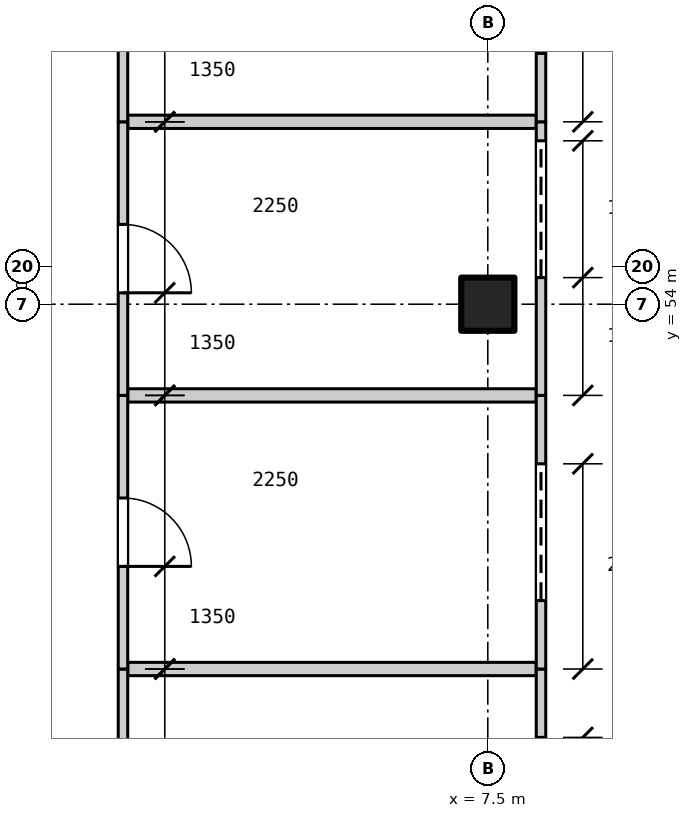
"""IFC4 building model, lengths in metres.
Left out: names, types, materials, properties, quantities, classifications, styles, units other than length and angle.
Written with IfcOpenShell. Run it as: python <this file> out.ifc"""

import sys

from ifc_helpers import new_model, si_unit, direction, frame, frame_2d, origin, origin_2d, place, context, subcontext, project, spatial, rectangle, extrude, element, fill, save


model = new_model("IFC4")
c1 = context("Model", 3, precision=1e-05, world=origin(), true_north=direction((0.0, 1.0)))
c2 = subcontext(c1, "Body", "Model", "MODEL_VIEW")
j1 = project(units=[si_unit("LENGTHUNIT", "METRE"), si_unit("PLANEANGLEUNIT", "RADIAN")], contexts=[c1])
p1 = place(None, origin())
s1 = spatial("IfcSite", under=j1, at=p1, CompositionType="ELEMENT")
p2 = place(p1, origin())
s2 = spatial("IfcBuilding", under=s1, at=p2, CompositionType="ELEMENT")
p3 = place(p2, origin())
s3 = spatial("IfcBuildingStorey", under=s2, at=p3, CompositionType="ELEMENT", Elevation=0.0)
p4 = place(p3, frame((7.5, 54.0, 0.0), z_axis=(0.0, 0.0, 1.0), x_axis=(1.0, 0.0, 0.0)))
e1 = element("IfcColumn", 1, at=p4, inside=s3, PredefinedType="COLUMN", context=c2, shape_type="SweptSolid", body=[
    extrude(rectangle(XDim=0.7, YDim=0.7, at=origin_2d()), origin(), (0.0, 0.0, 1.0), 6.0),
])
for number, where, z_axis, x_axis in (
    (2, (2.762, 49.2, 0.0), (0.0, 0.0, 1.0), (1.0, 0.0, 0.0)),
    (3, (2.762, 52.8, 0.0), (0.0, 0.0, 1.0), (1.0, 0.0, 0.0)),
    (4, (2.762, 56.4, 0.0), (0.0, 0.0, 1.0), (1.0, 0.0, 0.0)),
):
    element("IfcWall", number, at=place(p3, frame(where, z_axis=z_axis, x_axis=x_axis)), inside=s3, PredefinedType="PARTITIONING", context=c2, shape_type="SweptSolid", body=[
        extrude(rectangle(XDim=5.375, YDim=0.175, at=frame_2d((2.688, 0.0))), origin(), (0.0, 0.0, 1.0), 3.0),
    ])
p5 = place(p3, frame((2.7, 45.6, 0.0), z_axis=(0.0, 0.0, 1.0), x_axis=(0.0, 1.0, 0.0)))
e5 = element("IfcWall", 5, at=p5, inside=s3, PredefinedType="PARTITIONING", context=c2, shape_type="SweptSolid", body=[
    extrude(rectangle(XDim=3.6, YDim=0.125, at=frame_2d((1.8, 0.0))), origin(), (0.0, 0.0, 1.0), 3.0),
])
p6 = place(p5, frame((1.35, 0.0, 0.0)))
e6 = element("IfcOpeningElement", 6, at=p6, cuts=e5, PredefinedType="OPENING", context=c2, shape_type="SweptSolid", body=[
    extrude(rectangle(XDim=0.9, YDim=2.1, at=frame_2d((0.45, 1.05))), frame((0.0, 0.073, 0.0), z_axis=(0.0, -1.0, 0.0), x_axis=(1.0, 0.0, 0.0)), (0.0, 0.0, 1.0), 0.145),
])
p7 = place(p3, frame((2.7, 49.2, 0.0), z_axis=(0.0, 0.0, 1.0), x_axis=(0.0, 1.0, 0.0)))
e7 = element("IfcWall", 7, at=p7, inside=s3, PredefinedType="PARTITIONING", context=c2, shape_type="SweptSolid", body=[
    extrude(rectangle(XDim=3.6, YDim=0.125, at=frame_2d((1.8, 0.0))), origin(), (0.0, 0.0, 1.0), 3.0),
])
p8 = place(p7, frame((1.35, 0.0, 0.0)))
e8 = element("IfcOpeningElement", 8, at=p8, cuts=e7, PredefinedType="OPENING", context=c2, shape_type="SweptSolid", body=[
    extrude(rectangle(XDim=0.9, YDim=2.1, at=frame_2d((0.45, 1.05))), frame((0.0, 0.073, 0.0), z_axis=(0.0, -1.0, 0.0), x_axis=(1.0, 0.0, 0.0)), (0.0, 0.0, 1.0), 0.145),
])
p9 = place(p3, frame((2.7, 52.8, 0.0), z_axis=(0.0, 0.0, 1.0), x_axis=(0.0, 1.0, 0.0)))
e9 = element("IfcWall", 9, at=p9, inside=s3, PredefinedType="PARTITIONING", context=c2, shape_type="SweptSolid", body=[
    extrude(rectangle(XDim=3.6, YDim=0.125, at=frame_2d((1.8, 0.0))), origin(), (0.0, 0.0, 1.0), 3.0),
])
p10 = place(p9, frame((1.35, 0.0, 0.0)))
e10 = element("IfcOpeningElement", 10, at=p10, cuts=e9, PredefinedType="OPENING", context=c2, shape_type="SweptSolid", body=[
    extrude(rectangle(XDim=0.9, YDim=2.1, at=frame_2d((0.45, 1.05))), frame((0.0, 0.073, 0.0), z_axis=(0.0, -1.0, 0.0), x_axis=(1.0, 0.0, 0.0)), (0.0, 0.0, 1.0), 0.145),
])
p11 = place(p3, frame((2.7, 56.4, 0.0), z_axis=(0.0, 0.0, 1.0), x_axis=(0.0, 1.0, 0.0)))
e11 = element("IfcWall", 11, at=p11, inside=s3, PredefinedType="PARTITIONING", context=c2, shape_type="SweptSolid", body=[
    extrude(rectangle(XDim=3.6, YDim=0.125, at=frame_2d((1.8, 0.0))), origin(), (0.0, 0.0, 1.0), 3.0),
])
p12 = place(p11, frame((1.35, 0.0, 0.0)))
e12 = element("IfcOpeningElement", 12, at=p12, cuts=e11, PredefinedType="OPENING", context=c2, shape_type="SweptSolid", body=[
    extrude(rectangle(XDim=0.9, YDim=2.1, at=frame_2d((0.45, 1.05))), frame((0.0, 0.073, 0.0), z_axis=(0.0, -1.0, 0.0), x_axis=(1.0, 0.0, 0.0)), (0.0, 0.0, 1.0), 0.145),
])
p13 = place(p3, frame((8.2, 45.6, 0.0), z_axis=(0.0, 0.0, 1.0), x_axis=(0.0, 1.0, 0.0)))
e13 = element("IfcWall", 13, at=p13, inside=s3, PredefinedType="PARTITIONING", context=c2, shape_type="SweptSolid", body=[
    extrude(rectangle(XDim=3.6, YDim=0.125, at=frame_2d((1.8, 0.0))), origin(), (0.0, 0.0, 1.0), 3.0),
])
p14 = place(p13, frame((0.9, 0.0, 0.0)))
e14 = element("IfcOpeningElement", 14, at=p14, cuts=e13, PredefinedType="OPENING", context=c2, shape_type="SweptSolid", body=[
    extrude(rectangle(XDim=1.8, YDim=2.4, at=frame_2d((0.9, 1.2))), frame((0.0, 0.073, 0.0), z_axis=(0.0, -1.0, 0.0), x_axis=(1.0, 0.0, 0.0)), (0.0, 0.0, 1.0), 0.145),
])
p15 = place(p3, frame((8.2, 49.2, 0.0), z_axis=(0.0, 0.0, 1.0), x_axis=(0.0, 1.0, 0.0)))
e15 = element("IfcWall", 15, at=p15, inside=s3, PredefinedType="PARTITIONING", context=c2, shape_type="SweptSolid", body=[
    extrude(rectangle(XDim=3.6, YDim=0.125, at=frame_2d((1.8, 0.0))), origin(), (0.0, 0.0, 1.0), 3.0),
])
p16 = place(p15, frame((0.9, 0.0, 0.0)))
e16 = element("IfcOpeningElement", 16, at=p16, cuts=e15, PredefinedType="OPENING", context=c2, shape_type="SweptSolid", body=[
    extrude(rectangle(XDim=1.8, YDim=2.4, at=frame_2d((0.9, 1.2))), frame((0.0, 0.073, 0.0), z_axis=(0.0, -1.0, 0.0), x_axis=(1.0, 0.0, 0.0)), (0.0, 0.0, 1.0), 0.145),
])
p17 = place(p3, frame((8.2, 52.8, 0.0), z_axis=(0.0, 0.0, 1.0), x_axis=(0.0, 1.0, 0.0)))
e17 = element("IfcWall", 17, at=p17, inside=s3, PredefinedType="PARTITIONING", context=c2, shape_type="SweptSolid", body=[
    extrude(rectangle(XDim=3.6, YDim=0.125, at=frame_2d((1.8, 0.0))), origin(), (0.0, 0.0, 1.0), 3.0),
])
p18 = place(p17, frame((1.55, 0.0, 0.0)))
e18 = element("IfcOpeningElement", 18, at=p18, cuts=e17, PredefinedType="OPENING", context=c2, shape_type="SweptSolid", body=[
    extrude(rectangle(XDim=1.8, YDim=2.4, at=frame_2d((0.9, 1.2))), frame((0.0, 0.073, 0.0), z_axis=(0.0, -1.0, 0.0), x_axis=(1.0, 0.0, 0.0)), (0.0, 0.0, 1.0), 0.145),
])
p19 = place(p3, frame((8.2, 56.4, 0.0), z_axis=(0.0, 0.0, 1.0), x_axis=(0.0, 1.0, 0.0)))
e19 = element("IfcWall", 19, at=p19, inside=s3, PredefinedType="PARTITIONING", context=c2, shape_type="SweptSolid", body=[
    extrude(rectangle(XDim=3.6, YDim=0.125, at=frame_2d((1.8, 0.0))), origin(), (0.0, 0.0, 1.0), 3.0),
])
p20 = place(p19, frame((0.9, 0.0, 0.0)))
e20 = element("IfcOpeningElement", 20, at=p20, cuts=e19, PredefinedType="OPENING", context=c2, shape_type="SweptSolid", body=[
    extrude(rectangle(XDim=1.8, YDim=2.4, at=frame_2d((0.9, 1.2))), frame((0.0, 0.073, 0.0), z_axis=(0.0, -1.0, 0.0), x_axis=(1.0, 0.0, 0.0)), (0.0, 0.0, 1.0), 0.145),
])
p21 = place(p14, origin())
e21 = element("IfcDoor", 21, at=p21, inside=s3, OperationType="ROLLINGUP", PredefinedType="DOOR", context=c2, shape_type="SweptSolid", body=[
    extrude(rectangle(XDim=1.8, YDim=2.4, at=frame_2d((0.9, 1.2))), frame((0.0, 0.025, 0.0), z_axis=(0.0, -1.0, 0.0), x_axis=(1.0, 0.0, 0.0)), (0.0, 0.0, 1.0), 0.05),
])
fill(e14, e21)
p22 = place(p8, frame((0.9, 0.0, 0.0), z_axis=(0.0, 0.0, 1.0), x_axis=(-1.0, 0.0, 0.0)))
e22 = element("IfcDoor", 22, at=p22, inside=s3, OperationType="SINGLE_SWING_RIGHT", PredefinedType="DOOR", context=c2, shape_type="SweptSolid", body=[
    extrude(rectangle(XDim=0.9, YDim=2.1, at=frame_2d((0.45, 1.05))), frame((0.0, 0.025, 0.0), z_axis=(0.0, -1.0, 0.0), x_axis=(1.0, 0.0, 0.0)), (0.0, 0.0, 1.0), 0.05),
])
fill(e8, e22)
p23 = place(p16, origin())
e23 = element("IfcDoor", 23, at=p23, inside=s3, OperationType="ROLLINGUP", PredefinedType="DOOR", context=c2, shape_type="SweptSolid", body=[
    extrude(rectangle(XDim=1.8, YDim=2.4, at=frame_2d((0.9, 1.2))), frame((0.0, 0.025, 0.0), z_axis=(0.0, -1.0, 0.0), x_axis=(1.0, 0.0, 0.0)), (0.0, 0.0, 1.0), 0.05),
])
fill(e16, e23)
p24 = place(p10, frame((0.9, 0.0, 0.0), z_axis=(0.0, 0.0, 1.0), x_axis=(-1.0, 0.0, 0.0)))
e24 = element("IfcDoor", 24, at=p24, inside=s3, OperationType="SINGLE_SWING_RIGHT", PredefinedType="DOOR", context=c2, shape_type="SweptSolid", body=[
    extrude(rectangle(XDim=0.9, YDim=2.1, at=frame_2d((0.45, 1.05))), frame((0.0, 0.025, 0.0), z_axis=(0.0, -1.0, 0.0), x_axis=(1.0, 0.0, 0.0)), (0.0, 0.0, 1.0), 0.05),
])
fill(e10, e24)
p25 = place(p18, origin())
e25 = element("IfcDoor", 25, at=p25, inside=s3, OperationType="ROLLINGUP", PredefinedType="DOOR", context=c2, shape_type="SweptSolid", body=[
    extrude(rectangle(XDim=1.8, YDim=2.4, at=frame_2d((0.9, 1.2))), frame((0.0, 0.025, 0.0), z_axis=(0.0, -1.0, 0.0), x_axis=(1.0, 0.0, 0.0)), (0.0, 0.0, 1.0), 0.05),
])
fill(e18, e25)
p26 = place(p20, origin())
e26 = element("IfcDoor", 26, at=p26, inside=s3, OperationType="ROLLINGUP", PredefinedType="DOOR", context=c2, shape_type="SweptSolid", body=[
    extrude(rectangle(XDim=1.8, YDim=2.4, at=frame_2d((0.9, 1.2))), frame((0.0, 0.025, 0.0), z_axis=(0.0, -1.0, 0.0), x_axis=(1.0, 0.0, 0.0)), (0.0, 0.0, 1.0), 0.05),
])
fill(e20, e26)
save(model, sys.argv[1])
